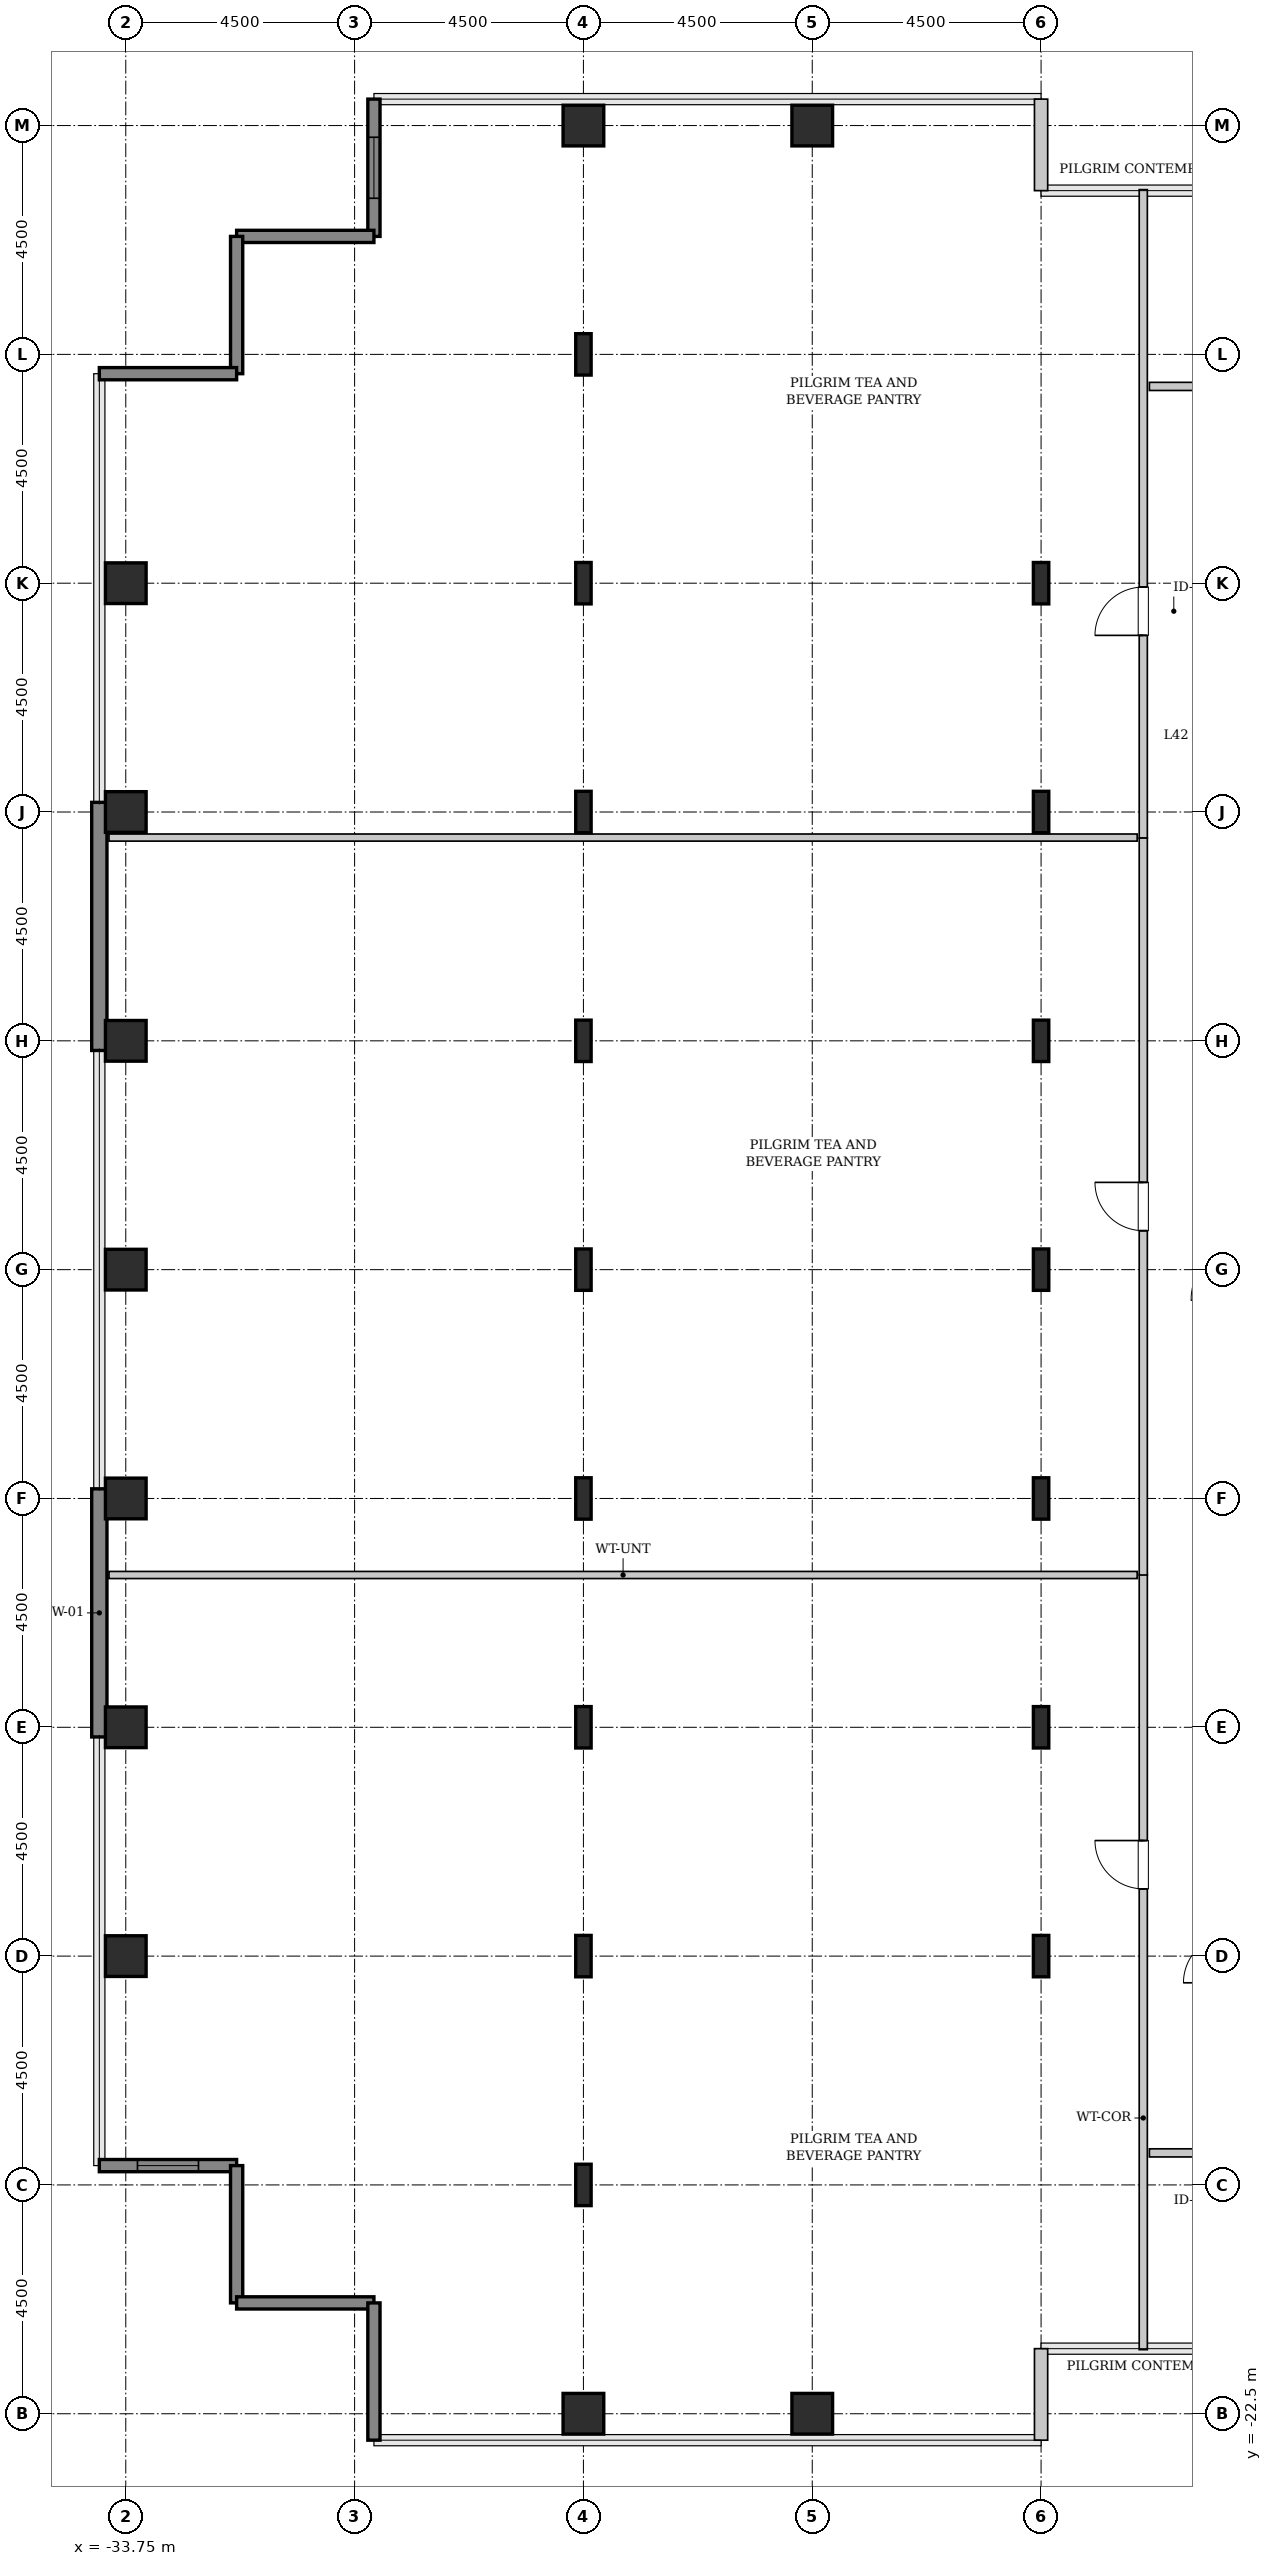
"""IFC4 building model, lengths in metres.
Left out: names, types, materials, properties, quantities, classifications, styles, units other than length and angle.
Written with IfcOpenShell. Run it as: python <this file> out.ifc"""

import sys

from ifc_helpers import new_model, si_unit, direction, frame, frame_2d, origin, origin_2d, place, context, subcontext, project, spatial, rectangle, hollow_rectangle, i_section, extrude, source, transform, mapped, element, fill, save


model = new_model("IFC4")
c1 = context("Model", 3, precision=1e-05, world=origin(), true_north=direction((0.0, 1.0)))
c2 = subcontext(c1, "Body", "Model", "MODEL_VIEW")
j1 = project(units=[si_unit("LENGTHUNIT", "METRE"), si_unit("PLANEANGLEUNIT", "RADIAN")], contexts=[c1])
p1 = place(None, origin())
s1 = spatial("IfcSite", under=j1, at=p1, CompositionType="ELEMENT")
p2 = place(p1, origin())
s2 = spatial("IfcBuilding", under=s1, at=p2, CompositionType="ELEMENT")
p3 = place(p2, frame((0.0, 0.0, 171.6)))
s3 = spatial("IfcBuildingStorey", under=s2, at=p3, CompositionType="ELEMENT", Elevation=171.6)
m1 = source(origin(), c2, "Body", "SweptSolid", [
    extrude(hollow_rectangle(XDim=0.8, YDim=0.8, WallThickness=0.04, InnerFilletRadius=0.04, OuterFilletRadius=0.08, at=origin_2d()), origin(), (0.0, 0.0, 1.0), 3.8),
])
for number, where, z_axis, x_axis in (
    (1, (-33.75, -13.5, 0.0), (0.0, 0.0, 1.0), (1.0, 0.0, 0.0)),
    (2, (-33.75, -9.0, 0.0), (0.0, 0.0, 1.0), (1.0, 0.0, 0.0)),
    (3, (-33.75, -4.5, 0.0), (0.0, 0.0, 1.0), (1.0, 0.0, 0.0)),
    (4, (-33.75, 0.0, 0.0), (0.0, 0.0, 1.0), (1.0, 0.0, 0.0)),
    (5, (-33.75, 4.5, 0.0), (0.0, 0.0, 1.0), (1.0, 0.0, 0.0)),
    (6, (-33.75, 9.0, 0.0), (0.0, 0.0, 1.0), (1.0, 0.0, 0.0)),
    (7, (-33.75, 13.5, 0.0), (0.0, 0.0, 1.0), (1.0, 0.0, 0.0)),
    (8, (-24.75, -22.5, 0.0), (0.0, 0.0, 1.0), (1.0, 0.0, 0.0)),
):
    element("IfcColumn", number, at=place(p3, frame(where, z_axis=z_axis, x_axis=x_axis)), inside=s3, PredefinedType="COLUMN", context=c2, shape_type="MappedRepresentation", body=[
        mapped(m1, transform((0.0, 0.0, 0.0), x_axis=(1.0, 0.0, 0.0), y_axis=(0.0, 1.0, 0.0), z_axis=(0.0, 0.0, 1.0), scale=1.0)),
    ])
m2 = source(origin(), c2, "Body", "SweptSolid", [
    extrude(i_section(OverallWidth=0.303, OverallDepth=0.814, WebThickness=0.021, FlangeThickness=0.04, FilletRadius=0.03, at=origin_2d()), origin(), (0.0, 0.0, 1.0), 3.8),
])
for number, where, z_axis, x_axis in (
    (9, (-24.75, -18.0, 0.0), (0.0, 0.0, 1.0), (1.0, 0.0, 0.0)),
    (10, (-24.75, -13.5, 0.0), (0.0, 0.0, 1.0), (1.0, 0.0, 0.0)),
    (11, (-24.75, -9.0, 0.0), (0.0, 0.0, 1.0), (1.0, 0.0, 0.0)),
    (12, (-24.75, -4.5, 0.0), (0.0, 0.0, 1.0), (1.0, 0.0, 0.0)),
    (13, (-24.75, 0.0, 0.0), (0.0, 0.0, 1.0), (1.0, 0.0, 0.0)),
    (14, (-24.75, 4.5, 0.0), (0.0, 0.0, 1.0), (1.0, 0.0, 0.0)),
    (15, (-24.75, 9.0, 0.0), (0.0, 0.0, 1.0), (1.0, 0.0, 0.0)),
    (16, (-24.75, 13.5, 0.0), (0.0, 0.0, 1.0), (1.0, 0.0, 0.0)),
    (17, (-24.75, 18.0, 0.0), (0.0, 0.0, 1.0), (1.0, 0.0, 0.0)),
):
    element("IfcColumn", number, at=place(p3, frame(where, z_axis=z_axis, x_axis=x_axis)), inside=s3, PredefinedType="COLUMN", context=c2, shape_type="MappedRepresentation", body=[
        mapped(m2, transform((0.0, 0.0, 0.0), x_axis=(1.0, 0.0, 0.0), y_axis=(0.0, 1.0, 0.0), z_axis=(0.0, 0.0, 1.0), scale=1.0)),
    ])
for number, where, z_axis, x_axis in (
    (18, (-24.75, 22.5, 0.0), (0.0, 0.0, 1.0), (1.0, 0.0, 0.0)),
    (19, (-20.25, -22.5, 0.0), (0.0, 0.0, 1.0), (1.0, 0.0, 0.0)),
    (20, (-20.25, 22.5, 0.0), (0.0, 0.0, 1.0), (1.0, 0.0, 0.0)),
):
    element("IfcColumn", number, at=place(p3, frame(where, z_axis=z_axis, x_axis=x_axis)), inside=s3, PredefinedType="COLUMN", context=c2, shape_type="MappedRepresentation", body=[
        mapped(m1, transform((0.0, 0.0, 0.0), x_axis=(1.0, 0.0, 0.0), y_axis=(0.0, 1.0, 0.0), z_axis=(0.0, 0.0, 1.0), scale=1.0)),
    ])
for number, where, z_axis, x_axis in (
    (21, (-15.75, -13.5, 0.0), (0.0, 0.0, 1.0), (1.0, 0.0, 0.0)),
    (22, (-15.75, -9.0, 0.0), (0.0, 0.0, 1.0), (1.0, 0.0, 0.0)),
    (23, (-15.75, -4.5, 0.0), (0.0, 0.0, 1.0), (1.0, 0.0, 0.0)),
    (24, (-15.75, 0.0, 0.0), (0.0, 0.0, 1.0), (1.0, 0.0, 0.0)),
    (25, (-15.75, 4.5, 0.0), (0.0, 0.0, 1.0), (1.0, 0.0, 0.0)),
    (26, (-15.75, 9.0, 0.0), (0.0, 0.0, 1.0), (1.0, 0.0, 0.0)),
    (27, (-15.75, 13.5, 0.0), (0.0, 0.0, 1.0), (1.0, 0.0, 0.0)),
):
    element("IfcColumn", number, at=place(p3, frame(where, z_axis=z_axis, x_axis=x_axis)), inside=s3, PredefinedType="COLUMN", context=c2, shape_type="MappedRepresentation", body=[
        mapped(m2, transform((0.0, 0.0, 0.0), x_axis=(1.0, 0.0, 0.0), y_axis=(0.0, 1.0, 0.0), z_axis=(0.0, 0.0, 1.0), scale=1.0)),
    ])
m3 = source(origin(), c2, "Body", "SweptSolid", [
    extrude(rectangle(XDim=4.88, YDim=0.3, at=frame_2d((2.44, 0.0))), origin(), (0.0, 0.0, 1.0), 3.55),
])
for number, where, z_axis, x_axis in (
    (28, (-34.27, -9.19, 0.0), (0.0, 0.0, 1.0), (0.0, 1.0, 0.0)),
    (29, (-34.27, 4.31, 0.0), (0.0, 0.0, 1.0), (0.0, 1.0, 0.0)),
):
    element("IfcWall", number, at=place(p3, frame(where, z_axis=z_axis, x_axis=x_axis)), inside=s3, PredefinedType="SHEAR", context=c2, shape_type="MappedRepresentation", body=[
        mapped(m3, transform((0.0, 0.0, 0.0), x_axis=(1.0, 0.0, 0.0), y_axis=(0.0, 1.0, 0.0), z_axis=(0.0, 0.0, 1.0), scale=1.0)),
    ])
m4 = source(origin(), c2, "Body", "SweptSolid", [
    extrude(rectangle(XDim=1.8, YDim=0.26, at=frame_2d((0.9, 0.0))), origin(), (0.0, 0.0, 1.0), 3.55),
])
p4 = place(p3, frame((-15.75, 21.22, 0.0), z_axis=(0.0, 0.0, 1.0), x_axis=(0.0, 1.0, 0.0)))
e30 = element("IfcWall", 30, at=p4, inside=s3, PredefinedType="SOLIDWALL", context=c2, shape_type="MappedRepresentation", body=[
    mapped(m4, transform((0.0, 0.0, 0.0), x_axis=(1.0, 0.0, 0.0), y_axis=(0.0, 1.0, 0.0), z_axis=(0.0, 0.0, 1.0), scale=1.0)),
])
m5 = source(origin(), c2, "Body", "SweptSolid", [
    extrude(rectangle(XDim=2.7, YDim=0.24, at=frame_2d((1.35, 0.0))), origin(), (0.0, 0.0, 1.0), 3.55),
])
p5 = place(p3, frame((-28.87, 23.02, 0.0), z_axis=(0.0, 0.0, 1.0), x_axis=(0.0, -1.0, 0.0)))
e31 = element("IfcWall", 31, at=p5, inside=s3, PredefinedType="SHEAR", context=c2, shape_type="MappedRepresentation", body=[
    mapped(m5, transform((0.0, 0.0, 0.0), x_axis=(1.0, 0.0, 0.0), y_axis=(0.0, 1.0, 0.0), z_axis=(0.0, 0.0, 1.0), scale=1.0)),
])
p6 = place(p5, frame((0.75, 0.0, 0.85)))
e32 = element("IfcOpeningElement", 32, at=p6, cuts=e31, PredefinedType="OPENING", context=c2, shape_type="SweptSolid", body=[
    extrude(rectangle(XDim=1.2, YDim=1.8, at=frame_2d((0.6, 0.9))), frame((0.0, 0.13, 0.0), z_axis=(0.0, -1.0, 0.0), x_axis=(1.0, 0.0, 0.0)), (0.0, 0.0, 1.0), 0.26),
])
for number, where, z_axis, x_axis in (
    (33, (-28.87, 20.32, 0.0), (0.0, 0.0, 1.0), (-1.0, 0.0, 0.0)),
    (34, (-31.57, 20.32, 0.0), (0.0, 0.0, 1.0), (0.0, -1.0, 0.0)),
    (35, (-31.57, 17.62, 0.0), (0.0, 0.0, 1.0), (-1.0, 0.0, 0.0)),
):
    element("IfcWall", number, at=place(p3, frame(where, z_axis=z_axis, x_axis=x_axis)), inside=s3, PredefinedType="SHEAR", context=c2, shape_type="MappedRepresentation", body=[
        mapped(m5, transform((0.0, 0.0, 0.0), x_axis=(1.0, 0.0, 0.0), y_axis=(0.0, 1.0, 0.0), z_axis=(0.0, 0.0, 1.0), scale=1.0)),
    ])
p7 = place(p3, frame((-34.27, -17.62, 0.0), z_axis=(0.0, 0.0, 1.0), x_axis=(1.0, 0.0, 0.0)))
e36 = element("IfcWall", 36, at=p7, inside=s3, PredefinedType="SHEAR", context=c2, shape_type="MappedRepresentation", body=[
    mapped(m5, transform((0.0, 0.0, 0.0), x_axis=(1.0, 0.0, 0.0), y_axis=(0.0, 1.0, 0.0), z_axis=(0.0, 0.0, 1.0), scale=1.0)),
])
p8 = place(p7, frame((0.75, 0.0, 0.85)))
e37 = element("IfcOpeningElement", 37, at=p8, cuts=e36, PredefinedType="OPENING", context=c2, shape_type="SweptSolid", body=[
    extrude(rectangle(XDim=1.2, YDim=1.8, at=frame_2d((0.6, 0.9))), frame((0.0, 0.13, 0.0), z_axis=(0.0, -1.0, 0.0), x_axis=(1.0, 0.0, 0.0)), (0.0, 0.0, 1.0), 0.26),
])
for number, where, z_axis, x_axis in (
    (38, (-31.57, -17.62, 0.0), (0.0, 0.0, 1.0), (0.0, -1.0, 0.0)),
    (39, (-31.57, -20.32, 0.0), (0.0, 0.0, 1.0), (1.0, 0.0, 0.0)),
    (40, (-28.87, -20.32, 0.0), (0.0, 0.0, 1.0), (0.0, -1.0, 0.0)),
):
    element("IfcWall", number, at=place(p3, frame(where, z_axis=z_axis, x_axis=x_axis)), inside=s3, PredefinedType="SHEAR", context=c2, shape_type="MappedRepresentation", body=[
        mapped(m5, transform((0.0, 0.0, 0.0), x_axis=(1.0, 0.0, 0.0), y_axis=(0.0, 1.0, 0.0), z_axis=(0.0, 0.0, 1.0), scale=1.0)),
    ])
p9 = place(p3, frame((-15.75, -23.02, 0.0), z_axis=(0.0, 0.0, 1.0), x_axis=(0.0, 1.0, 0.0)))
e41 = element("IfcWall", 41, at=p9, inside=s3, PredefinedType="SOLIDWALL", context=c2, shape_type="MappedRepresentation", body=[
    mapped(m4, transform((0.0, 0.0, 0.0), x_axis=(1.0, 0.0, 0.0), y_axis=(0.0, 1.0, 0.0), z_axis=(0.0, 0.0, 1.0), scale=1.0)),
])
m6 = source(origin(), c2, "Body", "SweptSolid", [
    extrude(rectangle(XDim=15.245, YDim=0.16, at=frame_2d((7.623, 0.0))), origin(), (0.0, 0.0, 1.0), 3.535),
])
p10 = place(p3, frame((-13.74, -21.24, 0.0), z_axis=(0.0, 0.0, 1.0), x_axis=(0.0, 1.0, 0.0)))
e42 = element("IfcWall", 42, at=p10, inside=s3, PredefinedType="PARTITIONING", context=c2, shape_type="MappedRepresentation", body=[
    mapped(m6, transform((0.0, 0.0, 0.0), x_axis=(1.0, 0.0, 0.0), y_axis=(0.0, 1.0, 0.0), z_axis=(0.0, 0.0, 1.0), scale=1.0)),
])
p11 = place(p10, frame((9.062, 0.0, 0.0)))
e43 = element("IfcOpeningElement", 43, at=p11, cuts=e42, PredefinedType="OPENING", context=c2, shape_type="SweptSolid", body=[
    extrude(rectangle(XDim=0.95, YDim=2.1, at=frame_2d((0.475, 1.05))), frame((0.0, 0.09, 0.0), z_axis=(0.0, -1.0, 0.0), x_axis=(1.0, 0.0, 0.0)), (0.0, 0.0, 1.0), 0.18),
])
m7 = source(origin(), c2, "Body", "SweptSolid", [
    extrude(rectangle(XDim=20.22, YDim=0.14, at=frame_2d((10.11, 0.0))), origin(), (0.0, 0.0, 1.0), 3.535),
])
p12 = place(p3, frame((-34.08, -6.005, 0.0), z_axis=(0.0, 0.0, 1.0), x_axis=(1.0, 0.0, 0.0)))
e44 = element("IfcWall", 44, at=p12, inside=s3, PredefinedType="PARTITIONING", context=c2, shape_type="MappedRepresentation", body=[
    mapped(m7, transform((0.0, 0.0, 0.0), x_axis=(1.0, 0.0, 0.0), y_axis=(0.0, 1.0, 0.0), z_axis=(0.0, 0.0, 1.0), scale=1.0)),
])
m8 = source(origin(), c2, "Body", "SweptSolid", [
    extrude(rectangle(XDim=12.752, YDim=0.16, at=frame_2d((6.376, 0.0))), origin(), (0.0, 0.0, 1.0), 3.535),
])
p13 = place(p3, frame((-13.74, 8.488, 0.0), z_axis=(0.0, 0.0, 1.0), x_axis=(0.0, 1.0, 0.0)))
e45 = element("IfcWall", 45, at=p13, inside=s3, PredefinedType="PARTITIONING", context=c2, shape_type="MappedRepresentation", body=[
    mapped(m8, transform((0.0, 0.0, 0.0), x_axis=(1.0, 0.0, 0.0), y_axis=(0.0, 1.0, 0.0), z_axis=(0.0, 0.0, 1.0), scale=1.0)),
])
p14 = place(p13, frame((3.986, 0.0, 0.0)))
e46 = element("IfcOpeningElement", 46, at=p14, cuts=e45, PredefinedType="OPENING", context=c2, shape_type="SweptSolid", body=[
    extrude(rectangle(XDim=0.95, YDim=2.1, at=frame_2d((0.475, 1.05))), frame((0.0, 0.09, 0.0), z_axis=(0.0, -1.0, 0.0), x_axis=(1.0, 0.0, 0.0)), (0.0, 0.0, 1.0), 0.18),
])
m9 = source(origin(), c2, "Body", "SweptSolid", [
    extrude(rectangle(XDim=20.22, YDim=0.14, at=frame_2d((10.11, 0.0))), origin(), (0.0, 0.0, 1.0), 2.875),
])
p15 = place(p3, frame((-34.08, 8.498, 0.0), z_axis=(0.0, 0.0, 1.0), x_axis=(1.0, 0.0, 0.0)))
e47 = element("IfcWall", 47, at=p15, inside=s3, PredefinedType="PARTITIONING", context=c2, shape_type="MappedRepresentation", body=[
    mapped(m9, transform((0.0, 0.0, 0.0), x_axis=(1.0, 0.0, 0.0), y_axis=(0.0, 1.0, 0.0), z_axis=(0.0, 0.0, 1.0), scale=1.0)),
])
m10 = source(origin(), c2, "Body", "SweptSolid", [
    extrude(rectangle(XDim=14.492, YDim=0.16, at=frame_2d((7.246, 0.0))), origin(), (0.0, 0.0, 1.0), 3.535),
])
p16 = place(p3, frame((-13.74, -6.005, 0.0), z_axis=(0.0, 0.0, 1.0), x_axis=(0.0, 1.0, 0.0)))
e48 = element("IfcWall", 48, at=p16, inside=s3, PredefinedType="PARTITIONING", context=c2, shape_type="MappedRepresentation", body=[
    mapped(m10, transform((0.0, 0.0, 0.0), x_axis=(1.0, 0.0, 0.0), y_axis=(0.0, 1.0, 0.0), z_axis=(0.0, 0.0, 1.0), scale=1.0)),
])
p17 = place(p16, frame((6.771, 0.0, 0.0)))
e49 = element("IfcOpeningElement", 49, at=p17, cuts=e48, PredefinedType="OPENING", context=c2, shape_type="SweptSolid", body=[
    extrude(rectangle(XDim=0.95, YDim=2.1, at=frame_2d((0.475, 1.05))), frame((0.0, 0.09, 0.0), z_axis=(0.0, -1.0, 0.0), x_axis=(1.0, 0.0, 0.0)), (0.0, 0.0, 1.0), 0.18),
])
m11 = source(origin(), c2, "Body", "SweptSolid", [
    extrude(rectangle(XDim=4.16, YDim=0.16, at=frame_2d((2.08, 0.0))), origin(), (0.0, 0.0, 1.0), 3.535),
])
p18 = place(p3, frame((-13.62, 17.37, 0.0), z_axis=(0.0, 0.0, 1.0), x_axis=(1.0, 0.0, 0.0)))
e50 = element("IfcWall", 50, at=p18, inside=s3, PredefinedType="PARTITIONING", context=c2, shape_type="MappedRepresentation", body=[
    mapped(m11, transform((0.0, 0.0, 0.0), x_axis=(1.0, 0.0, 0.0), y_axis=(0.0, 1.0, 0.0), z_axis=(0.0, 0.0, 1.0), scale=1.0)),
])
p19 = place(p18, frame((0.969, 0.0, 0.0)))
e51 = element("IfcOpeningElement", 51, at=p19, cuts=e50, PredefinedType="OPENING", context=c2, shape_type="SweptSolid", body=[
    extrude(rectangle(XDim=0.95, YDim=2.1, at=frame_2d((0.475, 1.05))), frame((0.0, 0.09, 0.0), z_axis=(0.0, -1.0, 0.0), x_axis=(1.0, 0.0, 0.0)), (0.0, 0.0, 1.0), 0.18),
])
m12 = source(origin(), c2, "Body", "SweptSolid", [
    extrude(rectangle(XDim=3.825, YDim=0.16, at=frame_2d((1.913, 0.0))), origin(), (0.0, 0.0, 1.0), 3.535),
])
p20 = place(p3, frame((-13.62, -17.37, 0.0), z_axis=(0.0, 0.0, 1.0), x_axis=(1.0, 0.0, 0.0)))
e52 = element("IfcWall", 52, at=p20, inside=s3, PredefinedType="PARTITIONING", context=c2, shape_type="MappedRepresentation", body=[
    mapped(m12, transform((0.0, 0.0, 0.0), x_axis=(1.0, 0.0, 0.0), y_axis=(0.0, 1.0, 0.0), z_axis=(0.0, 0.0, 1.0), scale=1.0)),
])
p21 = place(p20, frame((1.067, 0.0, 0.0)))
e53 = element("IfcOpeningElement", 53, at=p21, cuts=e52, PredefinedType="OPENING", context=c2, shape_type="SweptSolid", body=[
    extrude(rectangle(XDim=0.95, YDim=2.1, at=frame_2d((0.475, 1.05))), frame((0.0, 0.09, 0.0), z_axis=(0.0, -1.0, 0.0), x_axis=(1.0, 0.0, 0.0)), (0.0, 0.0, 1.0), 0.18),
])
m13 = source(origin(), c2, "Body", "SweptSolid", [
    extrude(rectangle(XDim=1.2, YDim=1.8, at=frame_2d((0.6, 0.9))), frame((0.0, 0.03, 0.0), z_axis=(0.0, -1.0, 0.0), x_axis=(1.0, 0.0, 0.0)), (0.0, 0.0, 1.0), 0.06),
])
p22 = place(p6, origin())
e54 = element("IfcWindow", 54, at=p22, inside=s3, PartitioningType="SINGLE_PANEL", PredefinedType="WINDOW", context=c2, shape_type="MappedRepresentation", body=[
    mapped(m13, transform((0.0, 0.0, 0.0), x_axis=(1.0, 0.0, 0.0), y_axis=(0.0, 1.0, 0.0), z_axis=(0.0, 0.0, 1.0), scale=1.0)),
])
fill(e32, e54)
p23 = place(p8, origin())
e55 = element("IfcWindow", 55, at=p23, inside=s3, PartitioningType="SINGLE_PANEL", PredefinedType="WINDOW", context=c2, shape_type="MappedRepresentation", body=[
    mapped(m13, transform((0.0, 0.0, 0.0), x_axis=(1.0, 0.0, 0.0), y_axis=(0.0, 1.0, 0.0), z_axis=(0.0, 0.0, 1.0), scale=1.0)),
])
fill(e37, e55)
m14 = source(origin(), c2, "Body", "SweptSolid", [
    extrude(rectangle(XDim=0.95, YDim=2.1, at=frame_2d((0.475, 1.05))), frame((0.0, 0.025, 0.0), z_axis=(0.0, -1.0, 0.0), x_axis=(1.0, 0.0, 0.0)), (0.0, 0.0, 1.0), 0.05),
])
p24 = place(p11, origin())
e56 = element("IfcDoor", 56, at=p24, inside=s3, OperationType="SINGLE_SWING_RIGHT", PredefinedType="DOOR", context=c2, shape_type="MappedRepresentation", body=[
    mapped(m14, transform((0.0, 0.0, 0.0), x_axis=(1.0, 0.0, 0.0), y_axis=(0.0, 1.0, 0.0), z_axis=(0.0, 0.0, 1.0), scale=1.0)),
])
fill(e43, e56)
p25 = place(p14, origin())
e57 = element("IfcDoor", 57, at=p25, inside=s3, OperationType="SINGLE_SWING_LEFT", PredefinedType="DOOR", context=c2, shape_type="MappedRepresentation", body=[
    mapped(m14, transform((0.0, 0.0, 0.0), x_axis=(1.0, 0.0, 0.0), y_axis=(0.0, 1.0, 0.0), z_axis=(0.0, 0.0, 1.0), scale=1.0)),
])
fill(e46, e57)
p26 = place(p17, origin())
e58 = element("IfcDoor", 58, at=p26, inside=s3, OperationType="SINGLE_SWING_RIGHT", PredefinedType="DOOR", context=c2, shape_type="MappedRepresentation", body=[
    mapped(m14, transform((0.0, 0.0, 0.0), x_axis=(1.0, 0.0, 0.0), y_axis=(0.0, 1.0, 0.0), z_axis=(0.0, 0.0, 1.0), scale=1.0)),
])
fill(e49, e58)
save(model, sys.argv[1])
